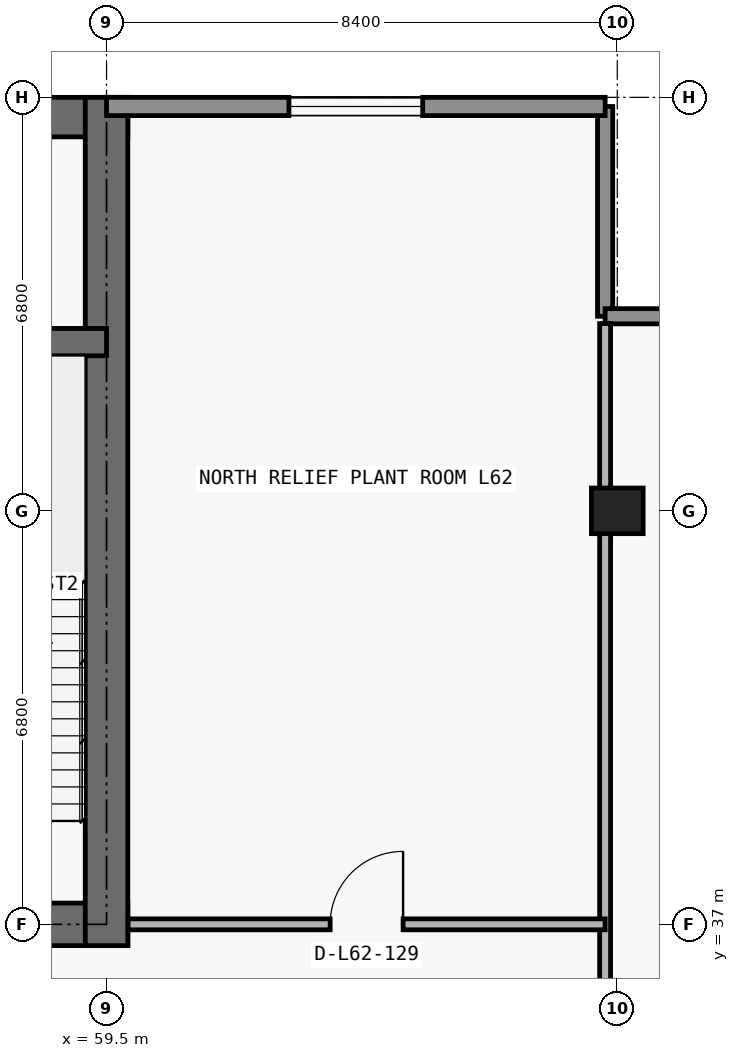
"""IFC4 building model, lengths in metres.
Left out: names, types, materials, properties, quantities, classifications, styles, units other than length and angle.
Written with IfcOpenShell. Run it as: python <this file> out.ifc"""

import sys

from ifc_helpers import new_model, si_unit, direction, frame, frame_2d, origin, origin_2d, place, context, subcontext, project, spatial, rectangle, extrude, element, fill, save


model = new_model("IFC4")
c1 = context("Model", 3, precision=1e-05, world=origin(), true_north=direction((0.0, 1.0)))
c2 = subcontext(c1, "Body", "Model", "MODEL_VIEW")
j1 = project(units=[si_unit("LENGTHUNIT", "METRE"), si_unit("PLANEANGLEUNIT", "RADIAN")], contexts=[c1])
p1 = place(None, origin())
s1 = spatial("IfcSite", under=j1, at=p1, CompositionType="ELEMENT")
p2 = place(p1, origin())
s2 = spatial("IfcBuilding", under=s1, at=p2, CompositionType="ELEMENT")
p3 = place(p2, frame((0.0, 0.0, 221.4)))
s3 = spatial("IfcBuildingStorey", under=s2, at=p3, CompositionType="ELEMENT", Elevation=221.4)
p4 = place(p3, frame((67.9, 43.8, 0.0), z_axis=(0.0, 0.0, 1.0), x_axis=(1.0, 0.0, 0.0)))
e1 = element("IfcColumn", 1, at=p4, inside=s3, PredefinedType="COLUMN", context=c2, shape_type="SweptSolid", body=[
    extrude(rectangle(XDim=0.85, YDim=0.75, at=origin_2d()), origin(), (0.0, 0.0, 1.0), 4.85),
])
p5 = place(p3, frame((17.95, 37.0, 0.0), z_axis=(0.0, 0.0, 1.0), x_axis=(1.0, 0.0, 0.0)))
e2 = element("IfcWall", 2, at=p5, inside=s3, PredefinedType="SHEAR", context=c2, shape_type="SweptSolid", body=[
    extrude(rectangle(XDim=41.9, YDim=0.7, at=frame_2d((20.95, 0.0))), origin(), (0.0, 0.0, 1.0), 4.85),
])
p6 = place(p5, frame((14.35, 0.0, 0.0)))
e3 = element("IfcOpeningElement", 3, at=p6, cuts=e2, PredefinedType="OPENING", context=c2, shape_type="SweptSolid", body=[
    extrude(rectangle(XDim=1.1, YDim=2.15, at=frame_2d((0.55, 1.075))), frame((0.0, 0.36, 0.0), z_axis=(0.0, -1.0, 0.0), x_axis=(1.0, 0.0, 0.0)), (0.0, 0.0, 1.0), 0.72),
])
p7 = place(p5, frame((6.2, 0.0, 0.0)))
e4 = element("IfcOpeningElement", 4, at=p7, cuts=e2, PredefinedType="OPENING", context=c2, shape_type="SweptSolid", body=[
    extrude(rectangle(XDim=1.05, YDim=2.15, at=frame_2d((0.525, 1.075))), frame((0.0, 0.36, 0.0), z_axis=(0.0, -1.0, 0.0), x_axis=(1.0, 0.0, 0.0)), (0.0, 0.0, 1.0), 0.72),
])
p8 = place(p5, frame((34.7, 0.0, 0.0)))
e5 = element("IfcOpeningElement", 5, at=p8, cuts=e2, PredefinedType="OPENING", context=c2, shape_type="SweptSolid", body=[
    extrude(rectangle(XDim=1.05, YDim=2.15, at=frame_2d((0.525, 1.075))), frame((0.0, 0.36, 0.0), z_axis=(0.0, -1.0, 0.0), x_axis=(1.0, 0.0, 0.0)), (0.0, 0.0, 1.0), 0.72),
])
p9 = place(p5, frame((10.812, 0.0, 0.0)))
e6 = element("IfcOpeningElement", 6, at=p9, cuts=e2, PredefinedType="OPENING", context=c2, shape_type="SweptSolid", body=[
    extrude(rectangle(XDim=1.05, YDim=2.15, at=frame_2d((0.525, 1.075))), frame((0.0, 0.36, 0.0), z_axis=(0.0, -1.0, 0.0), x_axis=(1.0, 0.0, 0.0)), (0.0, 0.0, 1.0), 0.72),
])
p10 = place(p5, frame((24.05, 0.0, 0.0)))
e7 = element("IfcOpeningElement", 7, at=p10, cuts=e2, PredefinedType="OPENING", context=c2, shape_type="SweptSolid", body=[
    extrude(rectangle(XDim=1.05, YDim=2.15, at=frame_2d((0.525, 1.075))), frame((0.0, 0.36, 0.0), z_axis=(0.0, -1.0, 0.0), x_axis=(1.0, 0.0, 0.0)), (0.0, 0.0, 1.0), 0.72),
])
p11 = place(p3, frame((17.95, 50.275, 0.0), z_axis=(0.0, 0.0, 1.0), x_axis=(1.0, 0.0, 0.0)))
e8 = element("IfcWall", 8, at=p11, inside=s3, PredefinedType="SHEAR", context=c2, shape_type="SweptSolid", body=[
    extrude(rectangle(XDim=41.9, YDim=0.65, at=frame_2d((20.95, 0.0))), origin(), (0.0, 0.0, 1.0), 4.85),
])
p12 = place(p3, frame((59.5, 36.65, 0.0), z_axis=(0.0, 0.0, 1.0), x_axis=(0.0, 1.0, 0.0)))
e9 = element("IfcWall", 9, at=p12, inside=s3, PredefinedType="SHEAR", context=c2, shape_type="SweptSolid", body=[
    extrude(rectangle(XDim=13.95, YDim=0.7, at=frame_2d((6.975, 0.0))), origin(), (0.0, 0.0, 1.0), 4.85),
])
p13 = place(p3, frame((18.3, 46.575, 0.0), z_axis=(0.0, 0.0, 1.0), x_axis=(1.0, 0.0, 0.0)))
e10 = element("IfcWall", 10, at=p13, inside=s3, PredefinedType="SHEAR", context=c2, shape_type="SweptSolid", body=[
    extrude(rectangle(XDim=41.2, YDim=0.45, at=frame_2d((20.6, 0.0))), origin(), (0.0, 0.0, 1.0), 4.85),
])
p14 = place(p13, frame((7.6, 0.0, 0.0)))
e11 = element("IfcOpeningElement", 11, at=p14, cuts=e10, PredefinedType="OPENING", context=c2, shape_type="SweptSolid", body=[
    extrude(rectangle(XDim=1.0, YDim=2.2, at=frame_2d((0.5, 1.1))), frame((0.0, 0.235, 0.0), z_axis=(0.0, -1.0, 0.0), x_axis=(1.0, 0.0, 0.0)), (0.0, 0.0, 1.0), 0.47),
])
p15 = place(p13, frame((32.625, 0.0, 0.0)))
e12 = element("IfcOpeningElement", 12, at=p15, cuts=e10, PredefinedType="OPENING", context=c2, shape_type="SweptSolid", body=[
    extrude(rectangle(XDim=1.05, YDim=2.15, at=frame_2d((0.525, 1.075))), frame((0.0, 0.235, 0.0), z_axis=(0.0, -1.0, 0.0), x_axis=(1.0, 0.0, 0.0)), (0.0, 0.0, 1.0), 0.47),
])
p16 = place(p3, frame((67.7, 50.45, 0.0), z_axis=(0.0, 0.0, 1.0), x_axis=(0.0, -1.0, 0.0)))
e13 = element("IfcWall", 13, at=p16, inside=s3, PredefinedType="ELEMENTEDWALL", context=c2, shape_type="SweptSolid", body=[
    extrude(rectangle(XDim=3.45, YDim=0.25, at=frame_2d((1.725, 0.0))), origin(), (0.0, 0.0, 1.0), 4.85),
])
p17 = place(p3, frame((67.7, 47.0, 0.0), z_axis=(0.0, 0.0, 1.0), x_axis=(1.0, 0.0, 0.0)))
e14 = element("IfcWall", 14, at=p17, inside=s3, PredefinedType="ELEMENTEDWALL", context=c2, shape_type="SweptSolid", body=[
    extrude(rectangle(XDim=3.85, YDim=0.25, at=frame_2d((1.925, 0.0))), origin(), (0.0, 0.0, 1.0), 4.85),
])
p18 = place(p3, frame((59.5, 50.45, 0.0), z_axis=(0.0, 0.0, 1.0), x_axis=(1.0, 0.0, 0.0)))
e15 = element("IfcWall", 15, at=p18, inside=s3, PredefinedType="STANDARD", context=c2, shape_type="SweptSolid", body=[
    extrude(rectangle(XDim=8.2, YDim=0.3, at=frame_2d((4.1, 0.0))), origin(), (0.0, 0.0, 1.0), 4.85),
])
p19 = place(p18, frame((3.0, 0.0, 0.85)))
e16 = element("IfcOpeningElement", 16, at=p19, cuts=e15, PredefinedType="OPENING", context=c2, shape_type="SweptSolid", body=[
    extrude(rectangle(XDim=2.2, YDim=1.55, at=frame_2d((1.1, 0.775))), frame((0.0, 0.16, 0.0), z_axis=(0.0, -1.0, 0.0), x_axis=(1.0, 0.0, 0.0)), (0.0, 0.0, 1.0), 0.32),
])
p20 = place(p3, frame((67.7, 12.9, 0.0), z_axis=(0.0, 0.0, 1.0), x_axis=(0.0, 1.0, 0.0)))
e17 = element("IfcWall", 17, at=p20, inside=s3, PredefinedType="PARTITIONING", context=c2, shape_type="SweptSolid", body=[
    extrude(rectangle(XDim=33.98, YDim=0.18, at=frame_2d((16.99, 0.0))), origin(), (0.0, 0.0, 1.0), 3.814),
])
p21 = place(p3, frame((59.855, 37.0, 0.0), z_axis=(0.0, 0.0, 1.0), x_axis=(1.0, 0.0, 0.0)))
e18 = element("IfcWall", 18, at=p21, inside=s3, PredefinedType="PARTITIONING", context=c2, shape_type="SweptSolid", body=[
    extrude(rectangle(XDim=7.845, YDim=0.18, at=frame_2d((3.922, 0.0))), origin(), (0.0, 0.0, 1.0), 4.85),
])
p22 = place(p21, frame((3.323, 0.0, 0.0)))
e19 = element("IfcOpeningElement", 19, at=p22, cuts=e18, PredefinedType="OPENING", context=c2, shape_type="SweptSolid", body=[
    extrude(rectangle(XDim=1.2, YDim=2.2, at=frame_2d((0.6, 1.1))), frame((0.0, 0.1, 0.0), z_axis=(0.0, -1.0, 0.0), x_axis=(1.0, 0.0, 0.0)), (0.0, 0.0, 1.0), 0.2),
])
p23 = place(p19, origin())
e20 = element("IfcWindow", 20, at=p23, inside=s3, PartitioningType="SINGLE_PANEL", PredefinedType="WINDOW", context=c2, shape_type="SweptSolid", body=[
    extrude(rectangle(XDim=2.2, YDim=1.55, at=frame_2d((1.1, 0.775))), frame((0.0, 0.03, 0.0), z_axis=(0.0, -1.0, 0.0), x_axis=(1.0, 0.0, 0.0)), (0.0, 0.0, 1.0), 0.06),
])
fill(e16, e20)
p24 = place(p22, origin())
e21 = element("IfcDoor", 21, at=p24, inside=s3, OperationType="SINGLE_SWING_RIGHT", PredefinedType="DOOR", context=c2, shape_type="SweptSolid", body=[
    extrude(rectangle(XDim=1.2, YDim=2.2, at=frame_2d((0.6, 1.1))), frame((0.0, 0.025, 0.0), z_axis=(0.0, -1.0, 0.0), x_axis=(1.0, 0.0, 0.0)), (0.0, 0.0, 1.0), 0.05),
])
fill(e19, e21)
save(model, sys.argv[1])
